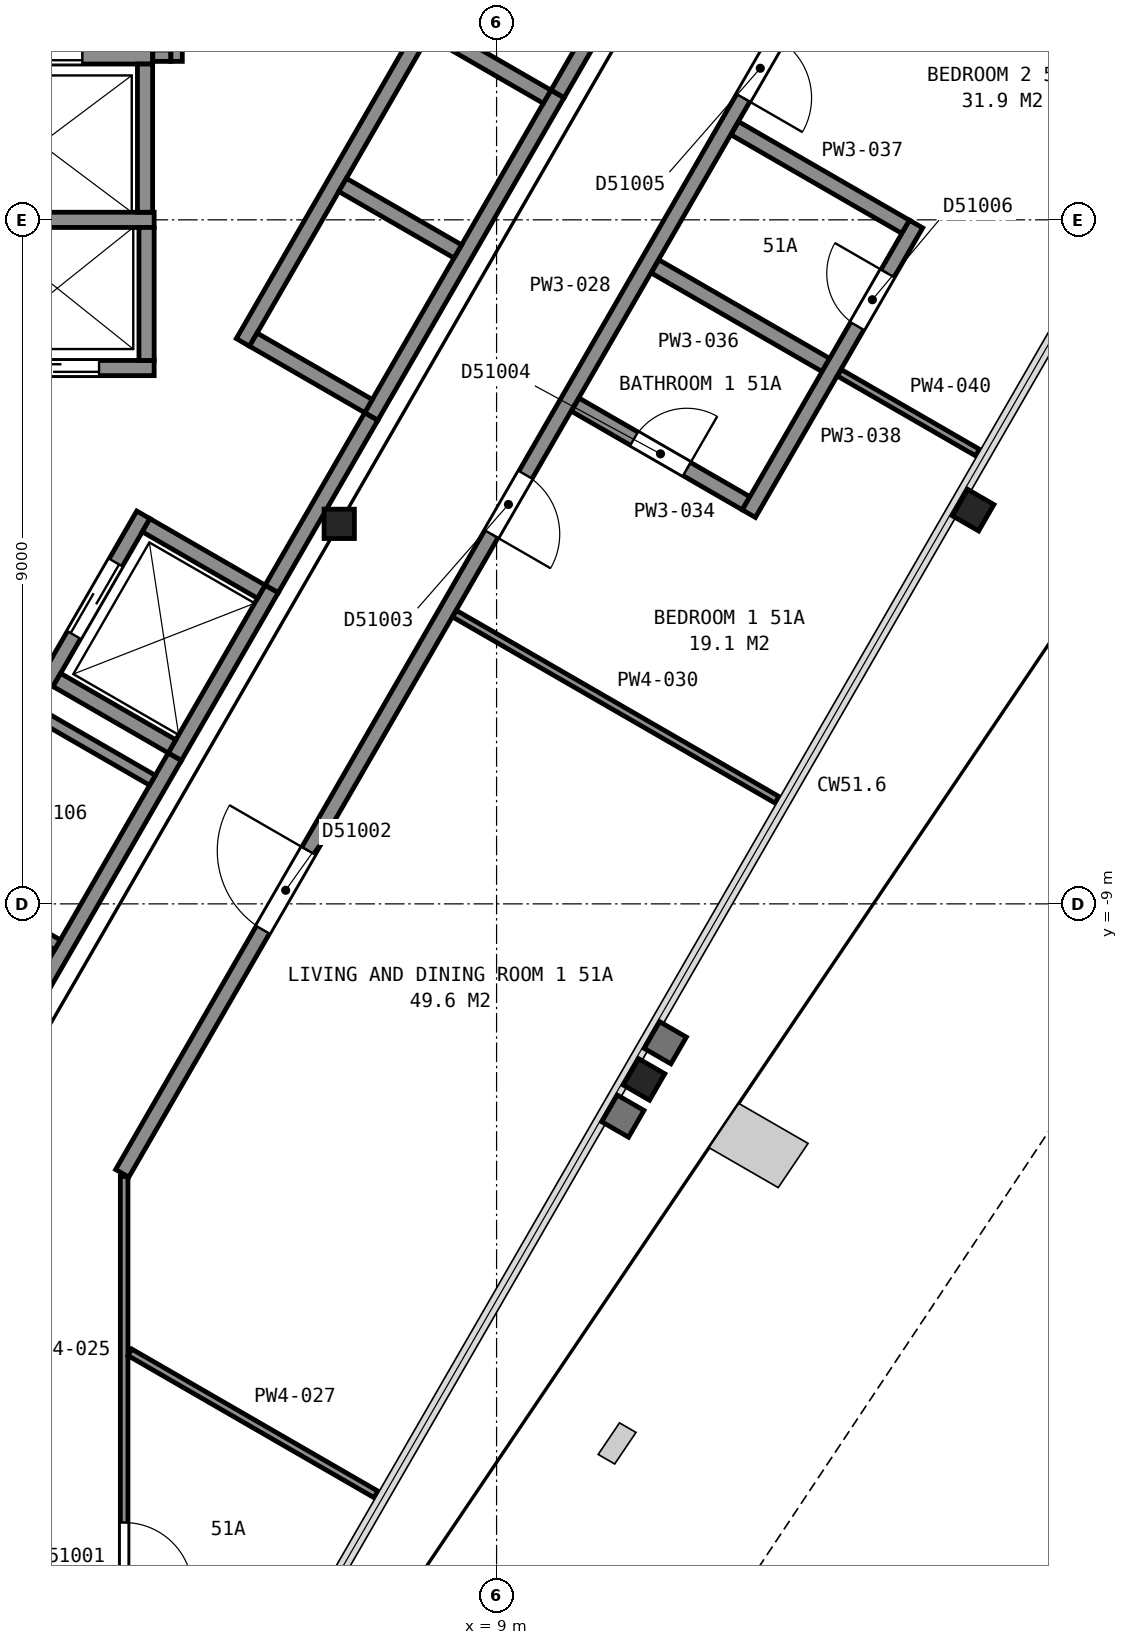
"""IFC4 building model, lengths in metres.
Left out: names, types, materials, properties, quantities, classifications, styles, units other than length and angle.
Written with IfcOpenShell. Run it as: python <this file> out.ifc"""

import sys

from ifc_helpers import new_model, si_unit, direction, frame, frame_2d, origin, origin_2d, place, context, subcontext, project, spatial, rectangle, i_section, extrude, element, fill, save


model = new_model("IFC4")
c1 = context("Model", 3, precision=1e-05, world=origin(), true_north=direction((0.0, 1.0)))
c2 = subcontext(c1, "Body", "Model", "MODEL_VIEW")
j1 = project(units=[si_unit("LENGTHUNIT", "METRE"), si_unit("PLANEANGLEUNIT", "RADIAN")], contexts=[c1])
p1 = place(None, origin())
s1 = spatial("IfcSite", under=j1, at=p1, CompositionType="ELEMENT")
p2 = place(p1, origin())
s2 = spatial("IfcBuilding", under=s1, at=p2, CompositionType="ELEMENT")
p3 = place(p2, frame((0.0, 0.0, 206.4)))
s3 = spatial("IfcBuildingStorey", under=s2, at=p3, CompositionType="ELEMENT", Elevation=206.4)
for number, where, z_axis, x_axis in (
    (1, (10.94, -11.31, 0.0), (0.0, 0.0, 1.0), (-0.5, -0.866, 0.0)),
    (2, (15.27, -3.82, 0.0), (0.0, 0.0, 1.0), (-0.5, -0.866, 0.0)),
):
    element("IfcColumn", number, at=place(p3, frame(where, z_axis=z_axis, x_axis=x_axis)), inside=s3, PredefinedType="COLUMN", context=c2, shape_type="SweptSolid", body=[
        extrude(i_section(OverallWidth=0.401, OverallDepth=0.399, WebThickness=0.025, FlangeThickness=0.04, FilletRadius=0.015, at=origin_2d()), origin(), (0.0, 0.0, 1.0), 3.7),
    ])
p4 = place(p3, frame((6.93, -4.0, 0.0), z_axis=(0.0, 0.0, 1.0), x_axis=(1.0, 0.0, 0.0)))
e3 = element("IfcColumn", 3, at=p4, inside=s3, PredefinedType="COLUMN", context=c2, shape_type="SweptSolid", body=[
    extrude(i_section(OverallWidth=0.399, OverallDepth=0.386, WebThickness=0.021, FlangeThickness=0.033, FilletRadius=0.015, at=origin_2d()), origin(), (0.0, 0.0, 1.0), 3.7),
])
p5 = place(p3, frame((-0.405, -1.95, 0.0), z_axis=(0.0, 0.0, 1.0), x_axis=(1.0, 0.0, 0.0)))
e4 = element("IfcWall", 4, at=p5, inside=s3, PredefinedType="PARTITIONING", context=c2, shape_type="SweptSolid", body=[
    extrude(rectangle(XDim=4.9, YDim=0.2, at=frame_2d((2.45, 0.0))), origin(), (0.0, 0.0, 1.0), 3.7),
])
p6 = place(p5, frame((0.725, 0.0, 0.0)))
e5 = element("IfcOpeningElement", 5, at=p6, cuts=e4, PredefinedType="OPENING", context=c2, shape_type="SweptSolid", body=[
    extrude(rectangle(XDim=1.1, YDim=2.1, at=frame_2d((0.55, 1.05))), frame((0.0, 0.11, 0.0), z_axis=(0.0, -1.0, 0.0), x_axis=(1.0, 0.0, 0.0)), (0.0, 0.0, 1.0), 0.22),
])
p7 = place(p5, frame((3.075, 0.0, 0.0)))
e6 = element("IfcOpeningElement", 6, at=p7, cuts=e4, PredefinedType="OPENING", context=c2, shape_type="SweptSolid", body=[
    extrude(rectangle(XDim=1.1, YDim=2.1, at=frame_2d((0.55, 1.05))), frame((0.0, 0.11, 0.0), z_axis=(0.0, -1.0, 0.0), x_axis=(1.0, 0.0, 0.0)), (0.0, 0.0, 1.0), 0.22),
])
p8 = place(p3, frame((-2.785, 0.0, 0.0), z_axis=(0.0, 0.0, 1.0), x_axis=(1.0, 0.0, 0.0)))
e7 = element("IfcWall", 7, at=p8, inside=s3, PredefinedType="PARTITIONING", context=c2, shape_type="SweptSolid", body=[
    extrude(rectangle(XDim=7.28, YDim=0.2, at=frame_2d((3.64, 0.0))), origin(), (0.0, 0.0, 1.0), 3.7),
])
p9 = place(p3, frame((1.525, 2.15, 0.0), z_axis=(0.0, 0.0, 1.0), x_axis=(1.0, 0.0, 0.0)))
e8 = element("IfcWall", 8, at=p9, inside=s3, PredefinedType="PARTITIONING", context=c2, shape_type="SweptSolid", body=[
    extrude(rectangle(XDim=2.95, YDim=0.2, at=frame_2d((1.475, 0.0))), origin(), (0.0, 0.0, 1.0), 3.7),
])
p10 = place(p9, frame((0.925, 0.0, 0.0)))
e9 = element("IfcOpeningElement", 9, at=p10, cuts=e8, PredefinedType="OPENING", context=c2, shape_type="SweptSolid", body=[
    extrude(rectangle(XDim=1.1, YDim=2.1, at=frame_2d((0.55, 1.05))), frame((0.0, 0.11, 0.0), z_axis=(0.0, -1.0, 0.0), x_axis=(1.0, 0.0, 0.0)), (0.0, 0.0, 1.0), 0.22),
])
p11 = place(p3, frame((4.766, -7.065, 0.0), z_axis=(0.0, 0.0, 1.0), x_axis=(0.499948979701, 0.866054858364, 0.0)))
e10 = element("IfcWall", 10, at=p11, inside=s3, PredefinedType="PARTITIONING", context=c2, shape_type="SweptSolid", body=[
    extrude(rectangle(XDim=2.55, YDim=0.2, at=frame_2d((1.275, 0.0))), origin(), (0.0, 0.0, 1.0), 3.7),
])
p12 = place(p3, frame((7.351, -2.587, 0.0), z_axis=(0.0, 0.0, 1.0), x_axis=(0.500002801628, 0.866023786258, 0.0)))
e11 = element("IfcWall", 11, at=p12, inside=s3, PredefinedType="PARTITIONING", context=c2, shape_type="SweptSolid", body=[
    extrude(rectangle(XDim=4.9, YDim=0.2, at=frame_2d((2.45, 0.0))), origin(), (0.0, 0.0, 1.0), 3.7),
])
p13 = place(p3, frame((3.077, -6.09, 0.0), z_axis=(0.0, 0.0, 1.0), x_axis=(0.500062241894, 0.865989465428, 0.0)))
e12 = element("IfcWall", 12, at=p13, inside=s3, PredefinedType="PARTITIONING", context=c2, shape_type="SweptSolid", body=[
    extrude(rectangle(XDim=2.55, YDim=0.2, at=frame_2d((1.275, 0.0))), origin(), (0.0, 0.0, 1.0), 3.7),
])
p14 = place(p13, frame((0.725, 0.0, 0.0)))
e13 = element("IfcOpeningElement", 13, at=p14, cuts=e12, PredefinedType="OPENING", context=c2, shape_type="SweptSolid", body=[
    extrude(rectangle(XDim=1.1, YDim=2.1, at=frame_2d((0.55, 1.05))), frame((0.0, 0.11, 0.0), z_axis=(0.0, -1.0, 0.0), x_axis=(1.0, 0.0, 0.0)), (0.0, 0.0, 1.0), 0.22),
])
p15 = place(p3, frame((5.663, -1.612, 0.0), z_axis=(0.0, 0.0, 1.0), x_axis=(0.49998122708, 0.866036242063, 0.0)))
e14 = element("IfcWall", 14, at=p15, inside=s3, PredefinedType="PARTITIONING", context=c2, shape_type="SweptSolid", body=[
    extrude(rectangle(XDim=4.9, YDim=0.2, at=frame_2d((2.45, 0.0))), origin(), (0.0, 0.0, 1.0), 3.7),
])
p16 = place(p3, frame((4.395, -1.85, 0.0), z_axis=(0.0, 0.0, 1.0), x_axis=(0.0, 1.0, 0.0)))
e15 = element("IfcWall", 15, at=p16, inside=s3, PredefinedType="PARTITIONING", context=c2, shape_type="SweptSolid", body=[
    extrude(rectangle(XDim=1.75, YDim=0.2, at=frame_2d((0.875, 0.0))), origin(), (0.0, 0.0, 1.0), 3.7),
])
p17 = place(p3, frame((4.375, 0.1, 0.0), z_axis=(0.0, 0.0, 1.0), x_axis=(0.0, 1.0, 0.0)))
e16 = element("IfcWall", 16, at=p17, inside=s3, PredefinedType="PARTITIONING", context=c2, shape_type="SweptSolid", body=[
    extrude(rectangle(XDim=1.95, YDim=0.2, at=frame_2d((0.975, 0.0))), origin(), (0.0, 0.0, 1.0), 3.7),
])
p18 = place(p3, frame((9.665, 1.62, 0.0), z_axis=(0.0, 0.0, 1.0), x_axis=(-0.866002029911, 0.500040482552, 0.0)))
e17 = element("IfcWall", 17, at=p18, inside=s3, PredefinedType="PARTITIONING", context=c2, shape_type="SweptSolid", body=[
    extrude(rectangle(XDim=1.75, YDim=0.2, at=frame_2d((0.875, 0.0))), origin(), (0.0, 0.0, 1.0), 3.7),
])
for number, where, z_axis, x_axis in (
    (18, (8.49, -0.416, 0.0), (0.0, 0.0, 1.0), (-0.866, 0.5, 0.0)),
    (19, (7.315, -2.451, 0.0), (0.0, 0.0, 1.0), (-0.866, 0.5, 0.0)),
):
    element("IfcWall", number, at=place(p3, frame(where, z_axis=z_axis, x_axis=x_axis)), inside=s3, PredefinedType="PARTITIONING", context=c2, shape_type="SweptSolid", body=[
        extrude(rectangle(XDim=1.75, YDim=0.2, at=frame_2d((0.875, 0.0))), origin(), (0.0, 0.0, 1.0), 3.7),
    ])
p19 = place(p3, frame((5.905, -4.893, 0.0), z_axis=(0.0, 0.0, 1.0), x_axis=(-0.866002029911, 0.500040482552, 0.0)))
e20 = element("IfcWall", 20, at=p19, inside=s3, PredefinedType="PARTITIONING", context=c2, shape_type="SweptSolid", body=[
    extrude(rectangle(XDim=1.75, YDim=0.2, at=frame_2d((0.875, 0.0))), origin(), (0.0, 0.0, 1.0), 3.7),
])
p20 = place(p3, frame((4.73, -6.928, 0.0), z_axis=(0.0, 0.0, 1.0), x_axis=(-0.866036909293, 0.499980071345, 0.0)))
e21 = element("IfcWall", 21, at=p20, inside=s3, PredefinedType="PARTITIONING", context=c2, shape_type="SweptSolid", body=[
    extrude(rectangle(XDim=1.75, YDim=0.2, at=frame_2d((0.875, 0.0))), origin(), (0.0, 0.0, 1.0), 3.7),
])
p21 = place(p3, frame((1.677, -12.415, 0.0), z_axis=(0.0, 0.0, 1.0), x_axis=(0.500054337157, 0.865994029939, 0.0)))
e22 = element("IfcWall", 22, at=p21, inside=s3, PredefinedType="PARTITIONING", context=c2, shape_type="SweptSolid", body=[
    extrude(rectangle(XDim=6.177, YDim=0.2, at=frame_2d((3.088, 0.0))), origin(), (0.0, 0.0, 1.0), 3.45),
])
for number, where, z_axis, x_axis in (
    (23, (1.728, -8.677, 0.0), (0.0, 0.0, 1.0), (0.866, -0.5, 0.0)),
    (24, (2.978, -6.511, 0.0), (0.0, 0.0, 1.0), (0.866, -0.5, 0.0)),
):
    element("IfcWall", number, at=place(p3, frame(where, z_axis=z_axis, x_axis=x_axis)), inside=s3, PredefinedType="PARTITIONING", context=c2, shape_type="SweptSolid", body=[
        extrude(rectangle(XDim=1.725, YDim=0.15, at=frame_2d((0.863, 0.0))), origin(), (0.0, 0.0, 1.0), 3.45),
    ])
p22 = place(p3, frame((4.477, 2.16, 0.0), z_axis=(0.0, 0.0, 1.0), x_axis=(1.0, 0.0, 0.0)))
e25 = element("IfcWall", 25, at=p22, inside=s3, PredefinedType="PARTITIONING", context=c2, shape_type="SweptSolid", body=[
    extrude(rectangle(XDim=0.238, YDim=0.15, at=frame_2d((0.119, 0.0))), origin(), (0.0, 0.0, 1.0), 3.45),
])
p23 = place(p3, frame((4.79, 2.085, 0.0), z_axis=(0.0, 0.0, 1.0), x_axis=(0.0, 1.0, 0.0)))
e26 = element("IfcWall", 26, at=p23, inside=s3, PredefinedType="PARTITIONING", context=c2, shape_type="SweptSolid", body=[
    extrude(rectangle(XDim=2.98, YDim=0.15, at=frame_2d((1.49, 0.0))), origin(), (0.0, 0.0, 1.0), 3.45),
])
p24 = place(p3, frame((6.042, -4.855, 0.0), z_axis=(0.0, 0.0, 1.0), x_axis=(0.500252727967, 0.865879442048, 0.0)))
e27 = element("IfcWall", 27, at=p24, inside=s3, PredefinedType="PARTITIONING", context=c2, shape_type="SweptSolid", body=[
    extrude(rectangle(XDim=2.617, YDim=0.2, at=frame_2d((1.309, 0.0))), origin(), (0.0, 0.0, 1.0), 3.45),
])
p25 = place(p3, frame((9.803, 1.658, 0.0), z_axis=(0.0, 0.0, 1.0), x_axis=(0.499943114462, 0.866058244174, 0.0)))
e28 = element("IfcWall", 28, at=p25, inside=s3, PredefinedType="PARTITIONING", context=c2, shape_type="SweptSolid", body=[
    extrude(rectangle(XDim=3.576, YDim=0.2, at=frame_2d((1.788, 0.0))), origin(), (0.0, 0.0, 1.0), 3.45),
])
p26 = place(p3, frame((4.1, -12.587, 0.0), z_axis=(0.0, 0.0, 1.0), x_axis=(0.0, -1.0, 0.0)))
e29 = element("IfcWall", 29, at=p26, inside=s3, PredefinedType="PARTITIONING", context=c2, shape_type="SweptSolid", body=[
    extrude(rectangle(XDim=8.063, YDim=0.1, at=frame_2d((4.031, 0.0))), origin(), (0.0, 0.0, 1.0), 2.713),
])
p27 = place(p26, frame((4.553, 0.0, 0.0)))
e30 = element("IfcOpeningElement", 30, at=p27, cuts=e29, PredefinedType="OPENING", context=c2, shape_type="SweptSolid", body=[
    extrude(rectangle(XDim=0.9, YDim=2.1, at=frame_2d((0.45, 1.05))), frame((0.0, 0.06, 0.0), z_axis=(0.0, -1.0, 0.0), x_axis=(1.0, 0.0, 0.0)), (0.0, 0.0, 1.0), 0.12),
])
p28 = place(p3, frame((4.175, -14.9, 0.0), z_axis=(0.0, 0.0, 1.0), x_axis=(0.866057308191, -0.499944735875, 0.0)))
e31 = element("IfcWall", 31, at=p28, inside=s3, PredefinedType="PARTITIONING", context=c2, shape_type="SweptSolid", body=[
    extrude(rectangle(XDim=3.74, YDim=0.1, at=frame_2d((1.87, 0.0))), origin(), (0.0, 0.0, 1.0), 2.713),
])
p29 = place(p3, frame((12.903, 2.745, 0.0), z_axis=(0.0, 0.0, 1.0), x_axis=(-0.499999743747, -0.866025551732, 0.0)))
e32 = element("IfcWall", 32, at=p29, inside=s3, PredefinedType="PARTITIONING", context=c2, shape_type="SweptSolid", body=[
    extrude(rectangle(XDim=17.656, YDim=0.2, at=frame_2d((8.828, 0.0))), origin(), (0.0, 0.0, 1.0), 2.713),
])
p30 = place(p29, frame((12.756, 0.0, 0.0)))
e33 = element("IfcOpeningElement", 33, at=p30, cuts=e32, PredefinedType="OPENING", context=c2, shape_type="SweptSolid", body=[
    extrude(rectangle(XDim=1.2, YDim=2.1, at=frame_2d((0.6, 1.05))), frame((0.0, 0.11, 0.0), z_axis=(0.0, -1.0, 0.0), x_axis=(1.0, 0.0, 0.0)), (0.0, 0.0, 1.0), 0.22),
])
p31 = place(p29, frame((7.044, 0.0, 0.0)))
e34 = element("IfcOpeningElement", 34, at=p31, cuts=e32, PredefinedType="OPENING", context=c2, shape_type="SweptSolid", body=[
    extrude(rectangle(XDim=0.9, YDim=2.1, at=frame_2d((0.45, 1.05))), frame((0.0, 0.11, 0.0), z_axis=(0.0, -1.0, 0.0), x_axis=(1.0, 0.0, 0.0)), (0.0, 0.0, 1.0), 0.22),
])
p32 = place(p29, frame((0.417, 0.0, 0.0)))
e35 = element("IfcOpeningElement", 35, at=p32, cuts=e32, PredefinedType="OPENING", context=c2, shape_type="SweptSolid", body=[
    extrude(rectangle(XDim=0.9, YDim=2.1, at=frame_2d((0.45, 1.05))), frame((0.0, 0.11, 0.0), z_axis=(0.0, -1.0, 0.0), x_axis=(1.0, 0.0, 0.0)), (0.0, 0.0, 1.0), 0.22),
])
p33 = place(p3, frame((8.447, -5.182, 0.0), z_axis=(0.0, 0.0, 1.0), x_axis=(0.866106755222, -0.499859068697, 0.0)))
e36 = element("IfcWall", 36, at=p33, inside=s3, PredefinedType="PARTITIONING", context=c2, shape_type="SweptSolid", body=[
    extrude(rectangle(XDim=4.899, YDim=0.1, at=frame_2d((2.449, 0.0))), origin(), (0.0, 0.0, 1.0), 2.713),
])
p34 = place(p3, frame((10.035, -2.431, 0.0), z_axis=(0.0, 0.0, 1.0), x_axis=(0.866028930478, -0.499993891537, 0.0)))
e37 = element("IfcWall", 37, at=p34, inside=s3, PredefinedType="PARTITIONING", context=c2, shape_type="SweptSolid", body=[
    extrude(rectangle(XDim=2.595, YDim=0.2, at=frame_2d((1.298, 0.0))), origin(), (0.0, 0.0, 1.0), 2.713),
])
p35 = place(p34, frame((0.895, 0.0, 0.0)))
e38 = element("IfcOpeningElement", 38, at=p35, cuts=e37, PredefinedType="OPENING", context=c2, shape_type="SweptSolid", body=[
    extrude(rectangle(XDim=0.8, YDim=2.1, at=frame_2d((0.4, 1.05))), frame((0.0, 0.11, 0.0), z_axis=(0.0, -1.0, 0.0), x_axis=(1.0, 0.0, 0.0)), (0.0, 0.0, 1.0), 0.22),
])
for number, where, z_axis, x_axis in (
    (39, (11.085, -0.613, 0.0), (0.0, 0.0, 1.0), (0.866, -0.5, 0.0)),
    (40, (12.135, 1.206, 0.0), (0.0, 0.0, 1.0), (0.866, -0.5, 0.0)),
):
    element("IfcWall", number, at=place(p3, frame(where, z_axis=z_axis, x_axis=x_axis)), inside=s3, PredefinedType="PARTITIONING", context=c2, shape_type="SweptSolid", body=[
        extrude(rectangle(XDim=2.595, YDim=0.2, at=frame_2d((1.297, 0.0))), origin(), (0.0, 0.0, 1.0), 2.713),
    ])
p36 = place(p3, frame((12.319, -3.866, 0.0), z_axis=(0.0, 0.0, 1.0), x_axis=(0.50001224981, 0.866018331238, 0.0)))
e41 = element("IfcWall", 41, at=p36, inside=s3, PredefinedType="PARTITIONING", context=c2, shape_type="SweptSolid", body=[
    extrude(rectangle(XDim=4.4, YDim=0.2, at=frame_2d((2.2, 0.0))), origin(), (0.0, 0.0, 1.0), 2.713),
])
p37 = place(p36, frame((2.85, 0.0, 0.0)))
e42 = element("IfcOpeningElement", 42, at=p37, cuts=e41, PredefinedType="OPENING", context=c2, shape_type="SweptSolid", body=[
    extrude(rectangle(XDim=0.8, YDim=2.1, at=frame_2d((0.4, 1.05))), frame((0.0, 0.11, 0.0), z_axis=(0.0, -1.0, 0.0), x_axis=(1.0, 0.0, 0.0)), (0.0, 0.0, 1.0), 0.22),
])
p38 = place(p3, frame((13.51, -2.012, 0.0), z_axis=(0.0, 0.0, 1.0), x_axis=(0.866022890907, -0.500004352405, 0.0)))
e43 = element("IfcWall", 43, at=p38, inside=s3, PredefinedType="PARTITIONING", context=c2, shape_type="SweptSolid", body=[
    extrude(rectangle(XDim=2.099, YDim=0.1, at=frame_2d((1.05, 0.0))), origin(), (0.0, 0.0, 1.0), 2.713),
])
p39 = place(p7, origin())
e44 = element("IfcDoor", 44, at=p39, inside=s3, OperationType="SLIDING_TO_RIGHT", PredefinedType="DOOR", context=c2, shape_type="SweptSolid", body=[
    extrude(rectangle(XDim=1.1, YDim=2.1, at=frame_2d((0.55, 1.05))), frame((0.0, 0.025, 0.0), z_axis=(0.0, -1.0, 0.0), x_axis=(1.0, 0.0, 0.0)), (0.0, 0.0, 1.0), 0.05),
])
fill(e6, e44)
p40 = place(p14, origin())
e45 = element("IfcDoor", 45, at=p40, inside=s3, OperationType="SLIDING_TO_LEFT", PredefinedType="DOOR", context=c2, shape_type="SweptSolid", body=[
    extrude(rectangle(XDim=1.1, YDim=2.1, at=frame_2d((0.55, 1.05))), frame((0.0, 0.025, 0.0), z_axis=(0.0, -1.0, 0.0), x_axis=(1.0, 0.0, 0.0)), (0.0, 0.0, 1.0), 0.05),
])
fill(e13, e45)
p41 = place(p10, origin())
e46 = element("IfcDoor", 46, at=p41, inside=s3, OperationType="SLIDING_TO_RIGHT", PredefinedType="DOOR", context=c2, shape_type="SweptSolid", body=[
    extrude(rectangle(XDim=1.1, YDim=2.1, at=frame_2d((0.55, 1.05))), frame((0.0, 0.025, 0.0), z_axis=(0.0, -1.0, 0.0), x_axis=(1.0, 0.0, 0.0)), (0.0, 0.0, 1.0), 0.05),
])
fill(e9, e46)
p42 = place(p27, origin())
e47 = element("IfcDoor", 47, at=p42, inside=s3, OperationType="SINGLE_SWING_RIGHT", PredefinedType="DOOR", context=c2, shape_type="SweptSolid", body=[
    extrude(rectangle(XDim=0.9, YDim=2.1, at=frame_2d((0.45, 1.05))), frame((0.0, 0.025, 0.0), z_axis=(0.0, -1.0, 0.0), x_axis=(1.0, 0.0, 0.0)), (0.0, 0.0, 1.0), 0.05),
])
fill(e30, e47)
p43 = place(p30, origin())
e48 = element("IfcDoor", 48, at=p43, inside=s3, OperationType="SINGLE_SWING_LEFT", PredefinedType="DOOR", context=c2, shape_type="SweptSolid", body=[
    extrude(rectangle(XDim=1.2, YDim=2.1, at=frame_2d((0.6, 1.05))), frame((0.0, 0.025, 0.0), z_axis=(0.0, -1.0, 0.0), x_axis=(1.0, 0.0, 0.0)), (0.0, 0.0, 1.0), 0.05),
])
fill(e33, e48)
p44 = place(p31, origin())
e49 = element("IfcDoor", 49, at=p44, inside=s3, OperationType="SINGLE_SWING_RIGHT", PredefinedType="DOOR", context=c2, shape_type="SweptSolid", body=[
    extrude(rectangle(XDim=0.9, YDim=2.1, at=frame_2d((0.45, 1.05))), frame((0.0, 0.025, 0.0), z_axis=(0.0, -1.0, 0.0), x_axis=(1.0, 0.0, 0.0)), (0.0, 0.0, 1.0), 0.05),
])
fill(e34, e49)
p45 = place(p32, origin())
e50 = element("IfcDoor", 50, at=p45, inside=s3, OperationType="SINGLE_SWING_RIGHT", PredefinedType="DOOR", context=c2, shape_type="SweptSolid", body=[
    extrude(rectangle(XDim=0.9, YDim=2.1, at=frame_2d((0.45, 1.05))), frame((0.0, 0.025, 0.0), z_axis=(0.0, -1.0, 0.0), x_axis=(1.0, 0.0, 0.0)), (0.0, 0.0, 1.0), 0.05),
])
fill(e35, e50)
p46 = place(p35, origin())
e51 = element("IfcDoor", 51, at=p46, inside=s3, OperationType="SINGLE_SWING_RIGHT", PredefinedType="DOOR", context=c2, shape_type="SweptSolid", body=[
    extrude(rectangle(XDim=0.8, YDim=2.1, at=frame_2d((0.4, 1.05))), frame((0.0, 0.025, 0.0), z_axis=(0.0, -1.0, 0.0), x_axis=(1.0, 0.0, 0.0)), (0.0, 0.0, 1.0), 0.05),
])
fill(e38, e51)
p47 = place(p37, origin())
e52 = element("IfcDoor", 52, at=p47, inside=s3, OperationType="SINGLE_SWING_RIGHT", PredefinedType="DOOR", context=c2, shape_type="SweptSolid", body=[
    extrude(rectangle(XDim=0.8, YDim=2.1, at=frame_2d((0.4, 1.05))), frame((0.0, 0.025, 0.0), z_axis=(0.0, -1.0, 0.0), x_axis=(1.0, 0.0, 0.0)), (0.0, 0.0, 1.0), 0.05),
])
fill(e42, e52)
save(model, sys.argv[1])
